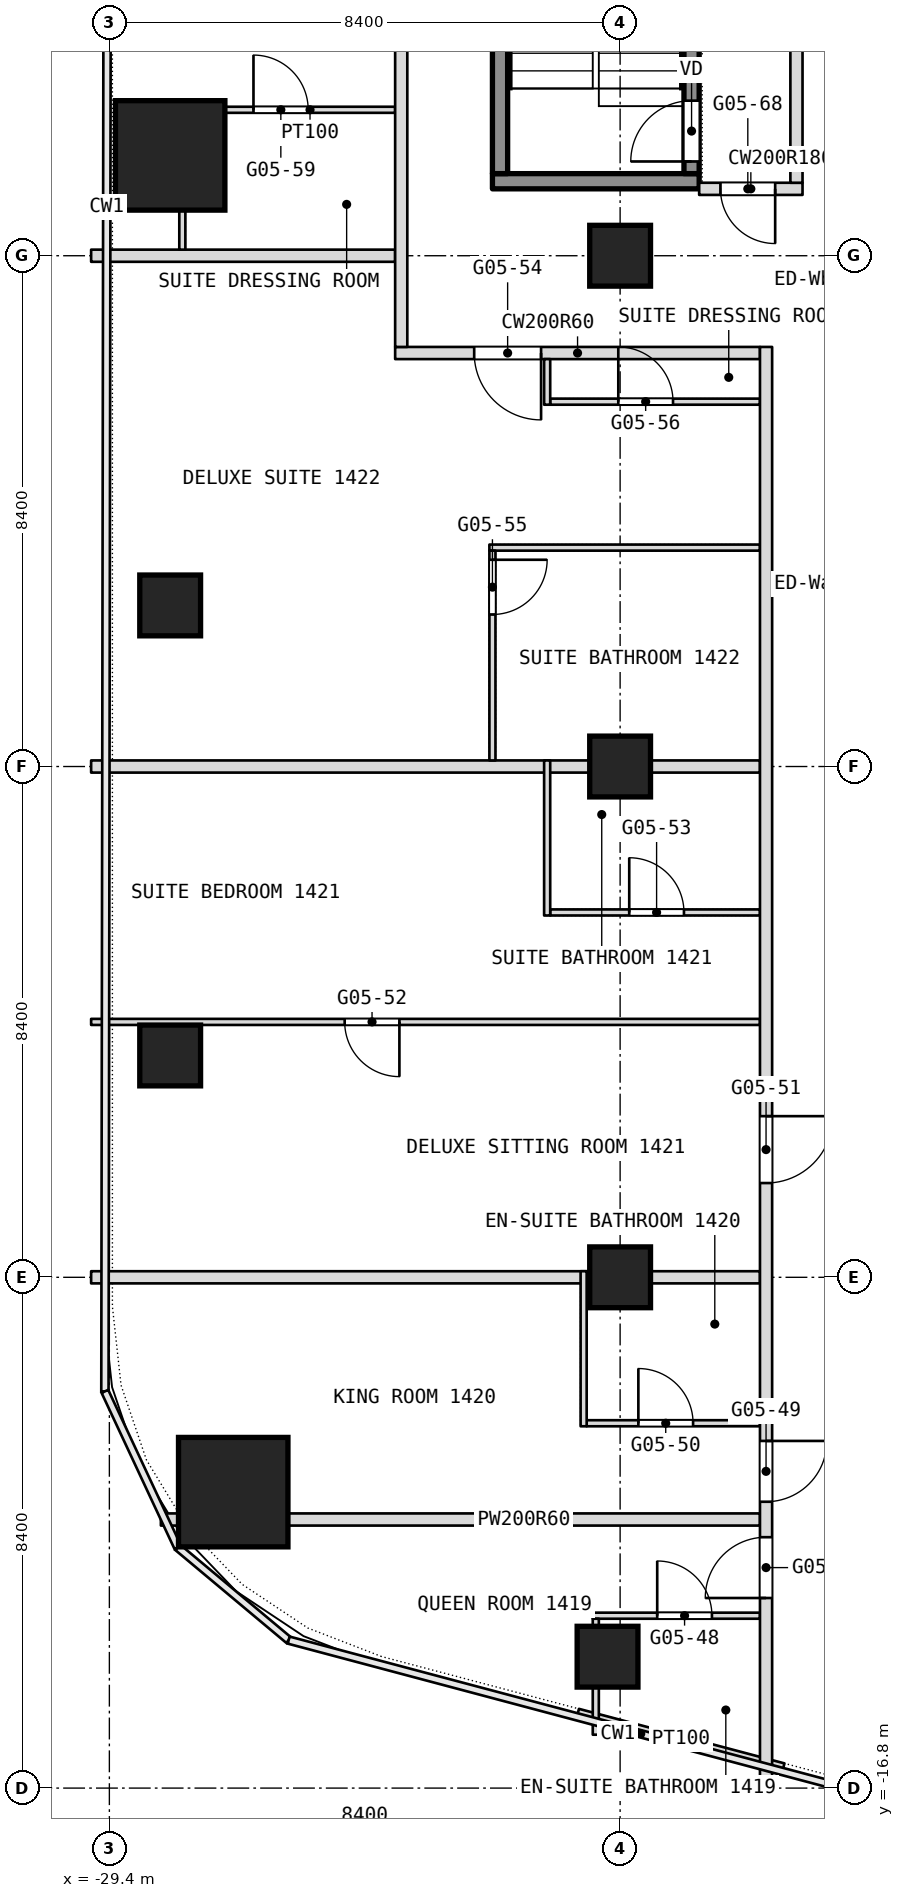
"""IFC4 building model, lengths in metres.
Left out: names, types, materials, properties, quantities, classifications, styles, units other than length and angle.
Written with IfcOpenShell. Run it as: python <this file> out.ifc"""

import sys

from ifc_helpers import new_model, si_unit, direction, frame, frame_2d, origin, origin_2d, place, context, subcontext, project, spatial, rectangle, extrude, element, fill, save


model = new_model("IFC4")
c1 = context("Model", 3, precision=1e-05, world=origin(), true_north=direction((0.0, 1.0)))
c2 = subcontext(c1, "Body", "Model", "MODEL_VIEW")
j1 = project(units=[si_unit("LENGTHUNIT", "METRE"), si_unit("PLANEANGLEUNIT", "RADIAN")], contexts=[c1])
p1 = place(None, origin())
s1 = spatial("IfcSite", under=j1, at=p1, CompositionType="ELEMENT")
p2 = place(p1, origin())
s2 = spatial("IfcBuilding", under=s1, at=p2, CompositionType="ELEMENT")
p3 = place(p2, frame((0.0, 0.0, 65.3)))
s3 = spatial("IfcBuildingStorey", under=s2, at=p3, CompositionType="ELEMENT", Elevation=65.3)
for number, where, z_axis, x_axis in (
    (1, (-27.363, -11.933, 0.0), (0.0, 0.0, 1.0), (1.0, 0.0, 0.0)),
    (2, (-28.4, 10.05, 0.0), (0.0, 0.0, 1.0), (1.0, 0.0, 0.0)),
):
    element("IfcColumn", number, at=place(p3, frame(where, z_axis=z_axis, x_axis=x_axis)), inside=s3, PredefinedType="COLUMN", context=c2, shape_type="SweptSolid", body=[
        extrude(rectangle(XDim=1.8, YDim=1.8, at=origin_2d()), origin(), (0.0, 0.0, 1.0), 3.6),
    ])
for number, where, z_axis, x_axis in (
    (3, (-21.0, -8.4, 0.0), (0.0, 0.0, 1.0), (1.0, 0.0, 0.0)),
    (4, (-21.0, 0.0, 0.0), (0.0, 0.0, 1.0), (1.0, 0.0, 0.0)),
    (5, (-21.0, 8.4, 0.0), (0.0, 0.0, 1.0), (1.0, 0.0, 0.0)),
    (6, (-28.4, -4.752, 0.0), (0.0, 0.0, 1.0), (1.0, 0.0, 0.0)),
    (7, (-28.4, 2.649, 0.0), (0.0, 0.0, 1.0), (1.0, 0.0, 0.0)),
    (8, (-21.207, -14.639, 0.0), (0.0, 0.0, 1.0), (1.0, 0.0, 0.0)),
):
    element("IfcColumn", number, at=place(p3, frame(where, z_axis=z_axis, x_axis=x_axis)), inside=s3, PredefinedType="COLUMN", context=c2, shape_type="SweptSolid", body=[
        extrude(rectangle(XDim=1.0, YDim=1.0, at=origin_2d()), origin(), (0.0, 0.0, 1.0), 3.6),
    ])
p4 = place(p3, frame((-21.69, -15.545, 0.0), z_axis=(0.0, 0.0, 1.0), x_axis=(0.966542484633, -0.25650657964, 0.0)))
e9 = element("IfcWall", 9, at=p4, inside=s3, PredefinedType="PARTITIONING", context=c2, shape_type="SweptSolid", body=[
    extrude(rectangle(XDim=3.497, YDim=0.1, at=frame_2d((1.749, 0.0))), origin(), (0.0, 0.0, 1.0), 3.34),
])
p5 = place(p3, frame((-21.45, -13.965, 0.0), z_axis=(0.0, 0.0, 1.0), x_axis=(1.0, 0.0, 0.0)))
e10 = element("IfcWall", 10, at=p5, inside=s3, PredefinedType="PARTITIONING", context=c2, shape_type="SweptSolid", body=[
    extrude(rectangle(XDim=2.75, YDim=0.1, at=frame_2d((1.375, 0.0))), origin(), (0.0, 0.0, 1.0), 3.34),
])
p6 = place(p5, frame((1.06, 0.0, 0.0)))
e11 = element("IfcOpeningElement", 11, at=p6, cuts=e10, PredefinedType="OPENING", context=c2, shape_type="SweptSolid", body=[
    extrude(rectangle(XDim=0.9, YDim=2.1, at=frame_2d((0.45, 1.05))), frame((0.0, 0.05, 0.0), z_axis=(0.0, -1.0, 0.0), x_axis=(1.0, 0.0, 0.0)), (0.0, 0.0, 1.0), 0.1),
])
p7 = place(p3, frame((-28.553, -12.383, 0.0), z_axis=(0.0, 0.0, 1.0), x_axis=(1.0, 0.0, 0.0)))
e12 = element("IfcWall", 12, at=p7, inside=s3, PredefinedType="PARTITIONING", context=c2, shape_type="SweptSolid", body=[
    extrude(rectangle(XDim=0.29, YDim=0.2, at=frame_2d((0.145, 0.0))), origin(), (0.0, 0.0, 1.0), 3.34),
])
p8 = place(p3, frame((-26.463, -12.383, 0.0), z_axis=(0.0, 0.0, 1.0), x_axis=(1.0, 0.0, 0.0)))
e13 = element("IfcWall", 13, at=p8, inside=s3, PredefinedType="PARTITIONING", context=c2, shape_type="SweptSolid", body=[
    extrude(rectangle(XDim=7.763, YDim=0.2, at=frame_2d((3.881, 0.0))), origin(), (0.0, 0.0, 1.0), 3.34),
])
p9 = place(p3, frame((-21.55, -10.8, 0.0), z_axis=(0.0, 0.0, 1.0), x_axis=(1.0, 0.0, 0.0)))
e14 = element("IfcWall", 14, at=p9, inside=s3, PredefinedType="PARTITIONING", context=c2, shape_type="SweptSolid", body=[
    extrude(rectangle(XDim=2.85, YDim=0.1, at=frame_2d((1.425, 0.0))), origin(), (0.0, 0.0, 1.0), 3.34),
])
p10 = place(p9, frame((0.85, 0.0, 0.0)))
e15 = element("IfcOpeningElement", 15, at=p10, cuts=e14, PredefinedType="OPENING", context=c2, shape_type="SweptSolid", body=[
    extrude(rectangle(XDim=0.9, YDim=2.1, at=frame_2d((0.45, 1.05))), frame((0.0, 0.05, 0.0), z_axis=(0.0, -1.0, 0.0), x_axis=(1.0, 0.0, 0.0)), (0.0, 0.0, 1.0), 0.1),
])
p11 = place(p3, frame((-29.7, -8.4, 0.0), z_axis=(0.0, 0.0, 1.0), x_axis=(1.0, 0.0, 0.0)))
e16 = element("IfcWall", 16, at=p11, inside=s3, PredefinedType="PARTITIONING", context=c2, shape_type="SweptSolid", body=[
    extrude(rectangle(XDim=11.0, YDim=0.2, at=frame_2d((5.5, 0.0))), origin(), (0.0, 0.0, 1.0), 2.84),
])
p12 = place(p3, frame((-29.7, -4.2, 0.0), z_axis=(0.0, 0.0, 1.0), x_axis=(1.0, 0.0, 0.0)))
e17 = element("IfcWall", 17, at=p12, inside=s3, PredefinedType="PARTITIONING", context=c2, shape_type="SweptSolid", body=[
    extrude(rectangle(XDim=11.0, YDim=0.1, at=frame_2d((5.5, 0.0))), origin(), (0.0, 0.0, 1.0), 3.34),
])
p13 = place(p12, frame((4.17, 0.0, 0.0)))
e18 = element("IfcOpeningElement", 18, at=p13, cuts=e17, PredefinedType="OPENING", context=c2, shape_type="SweptSolid", body=[
    extrude(rectangle(XDim=0.9, YDim=2.1, at=frame_2d((0.45, 1.05))), frame((0.0, 0.05, 0.0), z_axis=(0.0, -1.0, 0.0), x_axis=(1.0, 0.0, 0.0)), (0.0, 0.0, 1.0), 0.1),
])
p14 = place(p3, frame((-22.15, -2.4, 0.0), z_axis=(0.0, 0.0, 1.0), x_axis=(1.0, 0.0, 0.0)))
e19 = element("IfcWall", 19, at=p14, inside=s3, PredefinedType="PARTITIONING", context=c2, shape_type="SweptSolid", body=[
    extrude(rectangle(XDim=3.45, YDim=0.1, at=frame_2d((1.725, 0.0))), origin(), (0.0, 0.0, 1.0), 3.34),
])
p15 = place(p14, frame((1.3, 0.0, 0.0)))
e20 = element("IfcOpeningElement", 20, at=p15, cuts=e19, PredefinedType="OPENING", context=c2, shape_type="SweptSolid", body=[
    extrude(rectangle(XDim=0.9, YDim=2.1, at=frame_2d((0.45, 1.05))), frame((0.0, 0.05, 0.0), z_axis=(0.0, -1.0, 0.0), x_axis=(1.0, 0.0, 0.0)), (0.0, 0.0, 1.0), 0.1),
])
p16 = place(p3, frame((-29.7, 0.0, 0.0), z_axis=(0.0, 0.0, 1.0), x_axis=(1.0, 0.0, 0.0)))
e21 = element("IfcWall", 21, at=p16, inside=s3, PredefinedType="PARTITIONING", context=c2, shape_type="SweptSolid", body=[
    extrude(rectangle(XDim=11.0, YDim=0.2, at=frame_2d((5.5, 0.0))), origin(), (0.0, 0.0, 1.0), 2.84),
])
p17 = place(p3, frame((-23.15, 3.6, 0.0), z_axis=(0.0, 0.0, 1.0), x_axis=(1.0, 0.0, 0.0)))
e22 = element("IfcWall", 22, at=p17, inside=s3, PredefinedType="PARTITIONING", context=c2, shape_type="SweptSolid", body=[
    extrude(rectangle(XDim=4.45, YDim=0.1, at=frame_2d((2.225, 0.0))), origin(), (0.0, 0.0, 1.0), 3.34),
])
p18 = place(p3, frame((-22.15, 6.0, 0.0), z_axis=(0.0, 0.0, 1.0), x_axis=(1.0, 0.0, 0.0)))
e23 = element("IfcWall", 23, at=p18, inside=s3, PredefinedType="PARTITIONING", context=c2, shape_type="SweptSolid", body=[
    extrude(rectangle(XDim=3.45, YDim=0.1, at=frame_2d((1.725, 0.0))), origin(), (0.0, 0.0, 1.0), 3.34),
])
p19 = place(p18, frame((1.12, 0.0, 0.0)))
e24 = element("IfcOpeningElement", 24, at=p19, cuts=e23, PredefinedType="OPENING", context=c2, shape_type="SweptSolid", body=[
    extrude(rectangle(XDim=0.9, YDim=2.1, at=frame_2d((0.45, 1.05))), frame((0.0, 0.05, 0.0), z_axis=(0.0, -1.0, 0.0), x_axis=(1.0, 0.0, 0.0)), (0.0, 0.0, 1.0), 0.1),
])
p20 = place(p3, frame((-24.7, 6.8, 0.0), z_axis=(0.0, 0.0, 1.0), x_axis=(1.0, 0.0, 0.0)))
e25 = element("IfcWall", 25, at=p20, inside=s3, PredefinedType="PARTITIONING", context=c2, shape_type="SweptSolid", body=[
    extrude(rectangle(XDim=6.0, YDim=0.2, at=frame_2d((3.0, 0.0))), origin(), (0.0, 0.0, 1.0), 3.34),
])
p21 = place(p20, frame((1.3, 0.0, 0.0)))
e26 = element("IfcOpeningElement", 26, at=p21, cuts=e25, PredefinedType="OPENING", context=c2, shape_type="SweptSolid", body=[
    extrude(rectangle(XDim=1.1, YDim=2.1, at=frame_2d((0.55, 1.05))), frame((0.0, 0.1, 0.0), z_axis=(0.0, -1.0, 0.0), x_axis=(1.0, 0.0, 0.0)), (0.0, 0.0, 1.0), 0.2),
])
p22 = place(p3, frame((-29.7, 8.4, 0.0), z_axis=(0.0, 0.0, 1.0), x_axis=(1.0, 0.0, 0.0)))
e27 = element("IfcWall", 27, at=p22, inside=s3, PredefinedType="PARTITIONING", context=c2, shape_type="SweptSolid", body=[
    extrude(rectangle(XDim=5.0, YDim=0.2, at=frame_2d((2.5, 0.0))), origin(), (0.0, 0.0, 1.0), 2.84),
])
p23 = place(p3, frame((-19.7, 9.5, 0.0), z_axis=(0.0, 0.0, 1.0), x_axis=(1.0, 0.0, 0.0)))
e28 = element("IfcWall", 28, at=p23, inside=s3, PredefinedType="PARTITIONING", context=c2, shape_type="SweptSolid", body=[
    extrude(rectangle(XDim=1.7, YDim=0.2, at=frame_2d((0.85, 0.0))), origin(), (0.0, 0.0, 1.0), 3.34),
])
p24 = place(p23, frame((0.35, 0.0, 0.0)))
e29 = element("IfcOpeningElement", 29, at=p24, cuts=e28, PredefinedType="OPENING", context=c2, shape_type="SweptSolid", body=[
    extrude(rectangle(XDim=0.9, YDim=2.1, at=frame_2d((0.45, 1.05))), frame((0.0, 0.1, 0.0), z_axis=(0.0, -1.0, 0.0), x_axis=(1.0, 0.0, 0.0)), (0.0, 0.0, 1.0), 0.2),
])
p25 = place(p3, frame((-27.5, 10.8, 0.0), z_axis=(0.0, 0.0, 1.0), x_axis=(1.0, 0.0, 0.0)))
e30 = element("IfcWall", 30, at=p25, inside=s3, PredefinedType="PARTITIONING", context=c2, shape_type="SweptSolid", body=[
    extrude(rectangle(XDim=2.8, YDim=0.1, at=frame_2d((1.4, 0.0))), origin(), (0.0, 0.0, 1.0), 3.34),
])
p26 = place(p25, frame((0.47, 0.0, 0.0)))
e31 = element("IfcOpeningElement", 31, at=p26, cuts=e30, PredefinedType="OPENING", context=c2, shape_type="SweptSolid", body=[
    extrude(rectangle(XDim=0.9, YDim=2.1, at=frame_2d((0.45, 1.05))), frame((0.0, 0.05, 0.0), z_axis=(0.0, -1.0, 0.0), x_axis=(1.0, 0.0, 0.0)), (0.0, 0.0, 1.0), 0.1),
])
p27 = place(p3, frame((-18.1, 9.6, 0.0), z_axis=(0.0, 0.0, 1.0), x_axis=(0.0, 1.0, 0.0)))
e32 = element("IfcWall", 32, at=p27, inside=s3, PredefinedType="PARTITIONING", context=c2, shape_type="SweptSolid", body=[
    extrude(rectangle(XDim=6.2, YDim=0.2, at=frame_2d((3.1, 0.0))), origin(), (0.0, 0.0, 1.0), 3.34),
])
p28 = place(p3, frame((-18.6, -16.665, 0.0), z_axis=(0.0, 0.0, 1.0), x_axis=(0.0, 1.0, 0.0)))
e33 = element("IfcWall", 33, at=p28, inside=s3, PredefinedType="PARTITIONING", context=c2, shape_type="SweptSolid", body=[
    extrude(rectangle(XDim=23.565, YDim=0.2, at=frame_2d((11.782, 0.0))), origin(), (0.0, 0.0, 1.0), 3.34),
])
p29 = place(p28, frame((2.991, 0.0, 0.0)))
e34 = element("IfcOpeningElement", 34, at=p29, cuts=e33, PredefinedType="OPENING", context=c2, shape_type="SweptSolid", body=[
    extrude(rectangle(XDim=1.0, YDim=2.1, at=frame_2d((0.5, 1.05))), frame((0.0, 0.1, 0.0), z_axis=(0.0, -1.0, 0.0), x_axis=(1.0, 0.0, 0.0)), (0.0, 0.0, 1.0), 0.2),
])
p30 = place(p28, frame((4.574, 0.0, 0.0)))
e35 = element("IfcOpeningElement", 35, at=p30, cuts=e33, PredefinedType="OPENING", context=c2, shape_type="SweptSolid", body=[
    extrude(rectangle(XDim=1.0, YDim=2.1, at=frame_2d((0.5, 1.05))), frame((0.0, 0.1, 0.0), z_axis=(0.0, -1.0, 0.0), x_axis=(1.0, 0.0, 0.0)), (0.0, 0.0, 1.0), 0.2),
])
p31 = place(p28, frame((9.815, 0.0, 0.0)))
e36 = element("IfcOpeningElement", 36, at=p31, cuts=e33, PredefinedType="OPENING", context=c2, shape_type="SweptSolid", body=[
    extrude(rectangle(XDim=1.1, YDim=2.1, at=frame_2d((0.55, 1.05))), frame((0.0, 0.1, 0.0), z_axis=(0.0, -1.0, 0.0), x_axis=(1.0, 0.0, 0.0)), (0.0, 0.0, 1.0), 0.2),
])
p32 = place(p3, frame((-21.4, -15.922, 0.0), z_axis=(0.0, 0.0, 1.0), x_axis=(0.0, 1.0, 0.0)))
e37 = element("IfcWall", 37, at=p32, inside=s3, PredefinedType="PARTITIONING", context=c2, shape_type="SweptSolid", body=[
    extrude(rectangle(XDim=1.907, YDim=0.1, at=frame_2d((0.954, 0.0))), origin(), (0.0, 0.0, 1.0), 3.34),
])
for number, where, z_axis, x_axis in (
    (38, (-21.6, -10.85, 0.0), (0.0, 0.0, 1.0), (0.0, 1.0, 0.0)),
    (39, (-22.2, -2.45, 0.0), (0.0, 0.0, 1.0), (0.0, 1.0, 0.0)),
):
    element("IfcWall", number, at=place(p3, frame(where, z_axis=z_axis, x_axis=x_axis)), inside=s3, PredefinedType="PARTITIONING", context=c2, shape_type="SweptSolid", body=[
        extrude(rectangle(XDim=2.55, YDim=0.1, at=frame_2d((1.275, 0.0))), origin(), (0.0, 0.0, 1.0), 3.34),
    ])
p33 = place(p3, frame((-22.2, 5.95, 0.0), z_axis=(0.0, 0.0, 1.0), x_axis=(0.0, 1.0, 0.0)))
e40 = element("IfcWall", 40, at=p33, inside=s3, PredefinedType="PARTITIONING", context=c2, shape_type="SweptSolid", body=[
    extrude(rectangle(XDim=0.75, YDim=0.1, at=frame_2d((0.375, 0.0))), origin(), (0.0, 0.0, 1.0), 3.34),
])
p34 = place(p3, frame((-23.1, 0.1, 0.0), z_axis=(0.0, 0.0, 1.0), x_axis=(0.0, 1.0, 0.0)))
e41 = element("IfcWall", 41, at=p34, inside=s3, PredefinedType="PARTITIONING", context=c2, shape_type="SweptSolid", body=[
    extrude(rectangle(XDim=3.45, YDim=0.1, at=frame_2d((1.725, 0.0))), origin(), (0.0, 0.0, 1.0), 3.34),
])
p35 = place(p34, frame((2.4, 0.0, 0.0)))
e42 = element("IfcOpeningElement", 42, at=p35, cuts=e41, PredefinedType="OPENING", context=c2, shape_type="SweptSolid", body=[
    extrude(rectangle(XDim=0.9, YDim=2.1, at=frame_2d((0.45, 1.05))), frame((0.0, 0.05, 0.0), z_axis=(0.0, -1.0, 0.0), x_axis=(1.0, 0.0, 0.0)), (0.0, 0.0, 1.0), 0.1),
])
p36 = place(p3, frame((-24.6, 6.9, 0.0), z_axis=(0.0, 0.0, 1.0), x_axis=(0.0, 1.0, 0.0)))
e43 = element("IfcWall", 43, at=p36, inside=s3, PredefinedType="PARTITIONING", context=c2, shape_type="SweptSolid", body=[
    extrude(rectangle(XDim=11.6, YDim=0.2, at=frame_2d((5.8, 0.0))), origin(), (0.0, 0.0, 1.0), 3.34),
])
p37 = place(p36, frame((5.1, 0.0, 0.0)))
e44 = element("IfcOpeningElement", 44, at=p37, cuts=e43, PredefinedType="OPENING", context=c2, shape_type="SweptSolid", body=[
    extrude(rectangle(XDim=1.1, YDim=2.1, at=frame_2d((0.55, 1.05))), frame((0.0, 0.1, 0.0), z_axis=(0.0, -1.0, 0.0), x_axis=(1.0, 0.0, 0.0)), (0.0, 0.0, 1.0), 0.2),
])
p38 = place(p3, frame((-28.2, 8.5, 0.0), z_axis=(0.0, 0.0, 1.0), x_axis=(0.0, 1.0, 0.0)))
e45 = element("IfcWall", 45, at=p38, inside=s3, PredefinedType="PARTITIONING", context=c2, shape_type="SweptSolid", body=[
    extrude(rectangle(XDim=0.65, YDim=0.1, at=frame_2d((0.325, 0.0))), origin(), (0.0, 0.0, 1.0), 2.94),
])
p39 = place(p3, frame((-23.1, 9.625, 0.1), z_axis=(0.0, 0.0, 1.0), x_axis=(1.0, 0.0, 0.0)))
e46 = element("IfcWall", 46, at=p39, inside=s3, PredefinedType="SHEAR", context=c2, shape_type="SweptSolid", body=[
    extrude(rectangle(XDim=3.4, YDim=0.25, at=frame_2d((1.7, 0.0))), origin(), (0.0, 0.0, 1.0), 3.6),
])
p40 = place(p3, frame((-22.975, 9.75, 0.1), z_axis=(0.0, 0.0, 1.0), x_axis=(0.0, 1.0, 0.0)))
e47 = element("IfcWall", 47, at=p40, inside=s3, PredefinedType="SHEAR", context=c2, shape_type="SweptSolid", body=[
    extrude(rectangle(XDim=5.7, YDim=0.25, at=frame_2d((2.85, 0.0))), origin(), (0.0, 0.0, 1.0), 3.6),
])
p41 = place(p3, frame((-19.825, 9.75, 0.1), z_axis=(0.0, 0.0, 1.0), x_axis=(0.0, 1.0, 0.0)))
e48 = element("IfcWall", 48, at=p41, inside=s3, PredefinedType="SHEAR", context=c2, shape_type="SweptSolid", body=[
    extrude(rectangle(XDim=5.7, YDim=0.25, at=frame_2d((2.85, 0.0))), origin(), (0.0, 0.0, 1.0), 3.6),
])
p42 = place(p41, frame((0.2, 0.0, 0.0)))
e49 = element("IfcOpeningElement", 49, at=p42, cuts=e48, PredefinedType="OPENING", context=c2, shape_type="SweptSolid", body=[
    extrude(rectangle(XDim=1.0, YDim=2.1, at=frame_2d((0.5, 1.05))), frame((0.0, 0.125, 0.0), z_axis=(0.0, -1.0, 0.0), x_axis=(1.0, 0.0, 0.0)), (0.0, 0.0, 1.0), 0.25),
])
p43 = place(p6, origin())
e50 = element("IfcDoor", 50, at=p43, inside=s3, OperationType="SINGLE_SWING_RIGHT", PredefinedType="DOOR", context=c2, shape_type="SweptSolid", body=[
    extrude(rectangle(XDim=0.9, YDim=2.1, at=frame_2d((0.45, 1.05))), frame((0.0, 0.025, 0.0), z_axis=(0.0, -1.0, 0.0), x_axis=(1.0, 0.0, 0.0)), (0.0, 0.0, 1.0), 0.05),
])
fill(e11, e50)
p44 = place(p10, origin())
e51 = element("IfcDoor", 51, at=p44, inside=s3, OperationType="SINGLE_SWING_LEFT", PredefinedType="DOOR", context=c2, shape_type="SweptSolid", body=[
    extrude(rectangle(XDim=0.9, YDim=2.1, at=frame_2d((0.45, 1.05))), frame((0.0, 0.025, 0.0), z_axis=(0.0, -1.0, 0.0), x_axis=(1.0, 0.0, 0.0)), (0.0, 0.0, 1.0), 0.05),
])
fill(e15, e51)
p45 = place(p13, origin())
e52 = element("IfcDoor", 52, at=p45, inside=s3, OperationType="SINGLE_SWING_LEFT", PredefinedType="DOOR", context=c2, shape_type="SweptSolid", body=[
    extrude(rectangle(XDim=0.9, YDim=2.1, at=frame_2d((0.45, 1.05))), frame((0.0, 0.025, 0.0), z_axis=(0.0, -1.0, 0.0), x_axis=(1.0, 0.0, 0.0)), (0.0, 0.0, 1.0), 0.05),
])
fill(e18, e52)
p46 = place(p15, origin())
e53 = element("IfcDoor", 53, at=p46, inside=s3, OperationType="SINGLE_SWING_RIGHT", PredefinedType="DOOR", context=c2, shape_type="SweptSolid", body=[
    extrude(rectangle(XDim=0.9, YDim=2.1, at=frame_2d((0.45, 1.05))), frame((0.0, 0.025, 0.0), z_axis=(0.0, -1.0, 0.0), x_axis=(1.0, 0.0, 0.0)), (0.0, 0.0, 1.0), 0.05),
])
fill(e20, e53)
p47 = place(p19, origin())
e54 = element("IfcDoor", 54, at=p47, inside=s3, OperationType="SINGLE_SWING_LEFT", PredefinedType="DOOR", context=c2, shape_type="SweptSolid", body=[
    extrude(rectangle(XDim=0.9, YDim=2.1, at=frame_2d((0.45, 1.05))), frame((0.0, 0.025, 0.0), z_axis=(0.0, -1.0, 0.0), x_axis=(1.0, 0.0, 0.0)), (0.0, 0.0, 1.0), 0.05),
])
fill(e24, e54)
p48 = place(p21, origin())
e55 = element("IfcDoor", 55, at=p48, inside=s3, OperationType="SINGLE_SWING_LEFT", PredefinedType="DOOR", context=c2, shape_type="SweptSolid", body=[
    extrude(rectangle(XDim=1.1, YDim=2.1, at=frame_2d((0.55, 1.05))), frame((0.0, 0.025, 0.0), z_axis=(0.0, -1.0, 0.0), x_axis=(1.0, 0.0, 0.0)), (0.0, 0.0, 1.0), 0.05),
])
fill(e26, e55)
p49 = place(p24, origin())
e56 = element("IfcDoor", 56, at=p49, inside=s3, OperationType="SINGLE_SWING_RIGHT", PredefinedType="DOOR", context=c2, shape_type="SweptSolid", body=[
    extrude(rectangle(XDim=0.9, YDim=2.1, at=frame_2d((0.45, 1.05))), frame((0.0, 0.025, 0.0), z_axis=(0.0, -1.0, 0.0), x_axis=(1.0, 0.0, 0.0)), (0.0, 0.0, 1.0), 0.05),
])
fill(e29, e56)
p50 = place(p26, origin())
e57 = element("IfcDoor", 57, at=p50, inside=s3, OperationType="SINGLE_SWING_RIGHT", PredefinedType="DOOR", context=c2, shape_type="SweptSolid", body=[
    extrude(rectangle(XDim=0.9, YDim=2.1, at=frame_2d((0.45, 1.05))), frame((0.0, 0.025, 0.0), z_axis=(0.0, -1.0, 0.0), x_axis=(1.0, 0.0, 0.0)), (0.0, 0.0, 1.0), 0.05),
])
fill(e31, e57)
p51 = place(p29, origin())
e58 = element("IfcDoor", 58, at=p51, inside=s3, OperationType="SINGLE_SWING_RIGHT", PredefinedType="DOOR", context=c2, shape_type="SweptSolid", body=[
    extrude(rectangle(XDim=1.0, YDim=2.1, at=frame_2d((0.5, 1.05))), frame((0.0, 0.025, 0.0), z_axis=(0.0, -1.0, 0.0), x_axis=(1.0, 0.0, 0.0)), (0.0, 0.0, 1.0), 0.05),
])
fill(e34, e58)
p52 = place(p30, origin())
e59 = element("IfcDoor", 59, at=p52, inside=s3, OperationType="SINGLE_SWING_RIGHT", PredefinedType="DOOR", context=c2, shape_type="SweptSolid", body=[
    extrude(rectangle(XDim=1.0, YDim=2.1, at=frame_2d((0.5, 1.05))), frame((0.0, 0.025, 0.0), z_axis=(0.0, -1.0, 0.0), x_axis=(1.0, 0.0, 0.0)), (0.0, 0.0, 1.0), 0.05),
])
fill(e35, e59)
p53 = place(p31, origin())
e60 = element("IfcDoor", 60, at=p53, inside=s3, OperationType="SINGLE_SWING_RIGHT", PredefinedType="DOOR", context=c2, shape_type="SweptSolid", body=[
    extrude(rectangle(XDim=1.1, YDim=2.1, at=frame_2d((0.55, 1.05))), frame((0.0, 0.025, 0.0), z_axis=(0.0, -1.0, 0.0), x_axis=(1.0, 0.0, 0.0)), (0.0, 0.0, 1.0), 0.05),
])
fill(e36, e60)
p54 = place(p35, origin())
e61 = element("IfcDoor", 61, at=p54, inside=s3, OperationType="SINGLE_SWING_LEFT", PredefinedType="DOOR", context=c2, shape_type="SweptSolid", body=[
    extrude(rectangle(XDim=0.9, YDim=2.1, at=frame_2d((0.45, 1.05))), frame((0.0, 0.025, 0.0), z_axis=(0.0, -1.0, 0.0), x_axis=(1.0, 0.0, 0.0)), (0.0, 0.0, 1.0), 0.05),
])
fill(e42, e61)
p55 = place(p42, origin())
e62 = element("IfcDoor", 62, at=p55, inside=s3, OperationType="SINGLE_SWING_LEFT", PredefinedType="DOOR", context=c2, shape_type="SweptSolid", body=[
    extrude(rectangle(XDim=1.0, YDim=2.1, at=frame_2d((0.5, 1.05))), frame((0.0, 0.025, 0.0), z_axis=(0.0, -1.0, 0.0), x_axis=(1.0, 0.0, 0.0)), (0.0, 0.0, 1.0), 0.05),
])
fill(e49, e62)
save(model, sys.argv[1])
